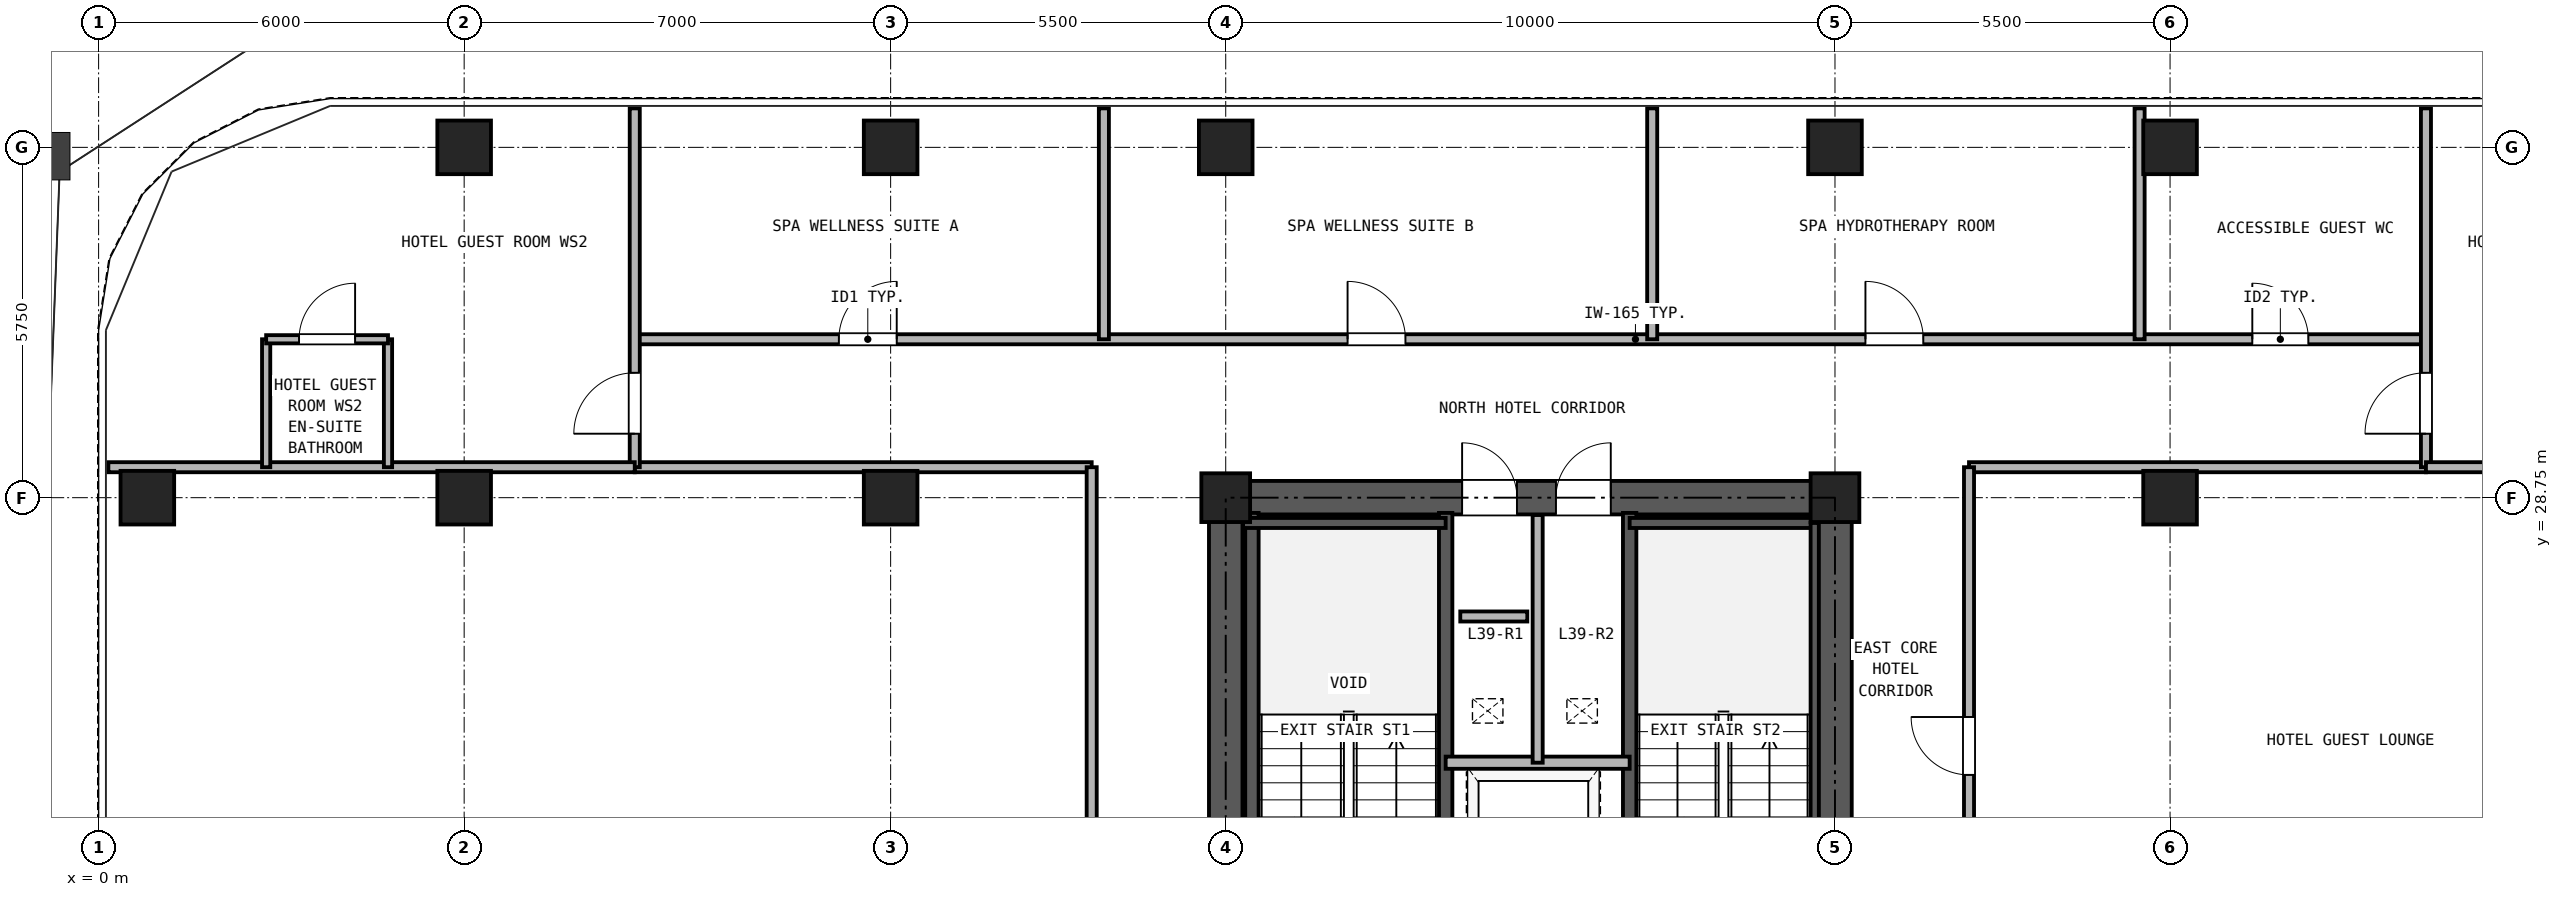
"""IFC4 building model, lengths in metres.
Left out: names, types, materials, properties, quantities, classifications, styles, units other than length and angle.
Written with IfcOpenShell. Run it as: python <this file> out.ifc"""

import sys

from ifc_helpers import new_model, si_unit, direction, frame, frame_2d, origin, origin_2d, place, context, subcontext, project, spatial, rectangle, hollow_rectangle, extrude, source, transform, mapped, element, fill, save


model = new_model("IFC4")
c1 = context("Model", 3, precision=1e-05, world=origin(), true_north=direction((0.0, 1.0)))
c2 = subcontext(c1, "Body", "Model", "MODEL_VIEW")
j1 = project(units=[si_unit("LENGTHUNIT", "METRE"), si_unit("PLANEANGLEUNIT", "RADIAN")], contexts=[c1])
p1 = place(None, origin())
s1 = spatial("IfcSite", under=j1, at=p1, CompositionType="ELEMENT")
p2 = place(p1, origin())
s2 = spatial("IfcBuilding", under=s1, at=p2, CompositionType="ELEMENT")
p3 = place(p2, frame((0.0, 0.0, 140.7)))
s3 = spatial("IfcBuildingStorey", under=s2, at=p3, CompositionType="ELEMENT", Elevation=140.7)
m1 = source(origin(), c2, "Body", "SweptSolid", [
    extrude(hollow_rectangle(XDim=0.88, YDim=0.88, WallThickness=0.05, at=origin_2d()), origin(), (0.0, 0.0, 1.0), 2.84),
])
for number, where, z_axis, x_axis in (
    (1, (6.0, 34.5, 0.0), (0.0, 0.0, 1.0), (1.0, 0.0, 0.0)),
    (2, (13.0, 34.5, 0.0), (0.0, 0.0, 1.0), (1.0, 0.0, 0.0)),
    (3, (18.5, 34.5, 0.0), (0.0, 0.0, 1.0), (1.0, 0.0, 0.0)),
    (4, (28.5, 34.5, 0.0), (0.0, 0.0, 1.0), (1.0, 0.0, 0.0)),
    (5, (34.0, 34.5, 0.0), (0.0, 0.0, 1.0), (1.0, 0.0, 0.0)),
    (6, (0.8, 28.75, 0.0), (0.0, 0.0, 1.0), (1.0, 0.0, 0.0)),
    (7, (6.0, 28.75, 0.0), (0.0, 0.0, 1.0), (1.0, 0.0, 0.0)),
    (8, (13.0, 28.75, 0.0), (0.0, 0.0, 1.0), (1.0, 0.0, 0.0)),
):
    element("IfcColumn", number, at=place(p3, frame(where, z_axis=z_axis, x_axis=x_axis)), inside=s3, PredefinedType="COLUMN", context=c2, shape_type="MappedRepresentation", body=[
        mapped(m1, transform((0.0, 0.0, 0.0), x_axis=(1.0, 0.0, 0.0), y_axis=(0.0, 1.0, 0.0), z_axis=(0.0, 0.0, 1.0), scale=1.0)),
    ])
m2 = source(origin(), c2, "Body", "SweptSolid", [
    extrude(hollow_rectangle(XDim=0.8, YDim=0.8, WallThickness=0.045, at=origin_2d()), origin(), (0.0, 0.0, 1.0), 2.84),
])
for number, where, z_axis, x_axis in (
    (9, (18.5, 28.75, 0.0), (0.0, 0.0, 1.0), (1.0, 0.0, 0.0)),
    (10, (28.5, 28.75, 0.0), (0.0, 0.0, 1.0), (1.0, 0.0, 0.0)),
):
    element("IfcColumn", number, at=place(p3, frame(where, z_axis=z_axis, x_axis=x_axis)), inside=s3, PredefinedType="COLUMN", context=c2, shape_type="MappedRepresentation", body=[
        mapped(m2, transform((0.0, 0.0, 0.0), x_axis=(1.0, 0.0, 0.0), y_axis=(0.0, 1.0, 0.0), z_axis=(0.0, 0.0, 1.0), scale=1.0)),
    ])
p4 = place(p3, frame((34.0, 28.75, 0.0), z_axis=(0.0, 0.0, 1.0), x_axis=(1.0, 0.0, 0.0)))
e11 = element("IfcColumn", 11, at=p4, inside=s3, PredefinedType="COLUMN", context=c2, shape_type="MappedRepresentation", body=[
    mapped(m1, transform((0.0, 0.0, 0.0), x_axis=(1.0, 0.0, 0.0), y_axis=(0.0, 1.0, 0.0), z_axis=(0.0, 0.0, 1.0), scale=1.0)),
])
p5 = place(p3, frame((18.225, 28.75, 0.0), z_axis=(0.0, 0.0, 1.0), x_axis=(1.0, 0.0, 0.0)))
e12 = element("IfcWall", 12, at=p5, inside=s3, PredefinedType="SHEAR", context=c2, shape_type="SweptSolid", body=[
    extrude(rectangle(XDim=10.55, YDim=0.55, at=frame_2d((5.275, 0.0))), origin(), (0.0, 0.0, 1.0), 2.84),
])
p6 = place(p5, frame((4.155, 0.0, 0.0)))
e13 = element("IfcOpeningElement", 13, at=p6, cuts=e12, PredefinedType="OPENING", context=c2, shape_type="SweptSolid", body=[
    extrude(rectangle(XDim=0.9, YDim=2.05, at=frame_2d((0.45, 1.025))), frame((0.0, 0.285, 0.0), z_axis=(0.0, -1.0, 0.0), x_axis=(1.0, 0.0, 0.0)), (0.0, 0.0, 1.0), 0.57),
])
p7 = place(p5, frame((5.695, 0.0, 0.0)))
e14 = element("IfcOpeningElement", 14, at=p7, cuts=e12, PredefinedType="OPENING", context=c2, shape_type="SweptSolid", body=[
    extrude(rectangle(XDim=0.9, YDim=2.05, at=frame_2d((0.45, 1.025))), frame((0.0, 0.285, 0.0), z_axis=(0.0, -1.0, 0.0), x_axis=(1.0, 0.0, 0.0)), (0.0, 0.0, 1.0), 0.57),
])
p8 = place(p3, frame((18.5, 11.775, 0.0), z_axis=(0.0, 0.0, 1.0), x_axis=(0.0, 1.0, 0.0)))
e15 = element("IfcWall", 15, at=p8, inside=s3, PredefinedType="SHEAR", context=c2, shape_type="SweptSolid", body=[
    extrude(rectangle(XDim=16.7, YDim=0.55, at=frame_2d((8.35, 0.0))), origin(), (0.0, 0.0, 1.0), 2.84),
])
p9 = place(p8, frame((7.375, 0.0, 0.0)))
e16 = element("IfcOpeningElement", 16, at=p9, cuts=e15, PredefinedType="OPENING", context=c2, shape_type="SweptSolid", body=[
    extrude(rectangle(XDim=1.15, YDim=2.2, at=frame_2d((0.575, 1.1))), frame((0.0, 0.285, 0.0), z_axis=(0.0, -1.0, 0.0), x_axis=(1.0, 0.0, 0.0)), (0.0, 0.0, 1.0), 0.57),
])
p10 = place(p3, frame((28.5, 11.775, 0.0), z_axis=(0.0, 0.0, 1.0), x_axis=(0.0, 1.0, 0.0)))
e17 = element("IfcWall", 17, at=p10, inside=s3, PredefinedType="SHEAR", context=c2, shape_type="SweptSolid", body=[
    extrude(rectangle(XDim=16.7, YDim=0.55, at=frame_2d((8.35, 0.0))), origin(), (0.0, 0.0, 1.0), 2.84),
])
p11 = place(p10, frame((7.375, 0.0, 0.0)))
e18 = element("IfcOpeningElement", 18, at=p11, cuts=e17, PredefinedType="OPENING", context=c2, shape_type="SweptSolid", body=[
    extrude(rectangle(XDim=1.15, YDim=2.2, at=frame_2d((0.575, 1.1))), frame((0.0, 0.285, 0.0), z_axis=(0.0, -1.0, 0.0), x_axis=(1.0, 0.0, 0.0)), (0.0, 0.0, 1.0), 0.57),
])
for number, where, z_axis, x_axis in (
    (19, (18.93, 21.39, 0.0), (0.0, 0.0, 1.0), (0.0, 1.0, 0.0)),
    (20, (22.11, 21.39, 0.0), (0.0, 0.0, 1.0), (0.0, 1.0, 0.0)),
    (21, (25.13, 21.39, 0.0), (0.0, 0.0, 1.0), (0.0, 1.0, 0.0)),
):
    element("IfcWall", number, at=place(p3, frame(where, z_axis=z_axis, x_axis=x_axis)), inside=s3, PredefinedType="SOLIDWALL", context=c2, shape_type="SweptSolid", body=[
        extrude(rectangle(XDim=7.11, YDim=0.22, at=frame_2d((3.555, 0.0))), origin(), (0.0, 0.0, 1.0), 2.84),
    ])
p12 = place(p3, frame((18.785, 28.335, 0.0), z_axis=(0.0, 0.0, 1.0), x_axis=(1.0, 0.0, 0.0)))
e22 = element("IfcWall", 22, at=p12, inside=s3, PredefinedType="PARTITIONING", context=c2, shape_type="SweptSolid", body=[
    extrude(rectangle(XDim=3.325, YDim=0.165, at=frame_2d((1.663, 0.0))), origin(), (0.0, 0.0, 1.0), 2.84),
])
p13 = place(p3, frame((25.13, 28.335, 0.0), z_axis=(0.0, 0.0, 1.0), x_axis=(1.0, 0.0, 0.0)))
e23 = element("IfcWall", 23, at=p13, inside=s3, PredefinedType="PARTITIONING", context=c2, shape_type="SweptSolid", body=[
    extrude(rectangle(XDim=3.085, YDim=0.165, at=frame_2d((1.542, 0.0))), origin(), (0.0, 0.0, 1.0), 2.84),
])
p14 = place(p3, frame((28.167, 21.39, 0.0), z_axis=(0.0, 0.0, 1.0), x_axis=(0.0, 1.0, 0.0)))
e24 = element("IfcWall", 24, at=p14, inside=s3, PredefinedType="PARTITIONING", context=c2, shape_type="SweptSolid", body=[
    extrude(rectangle(XDim=6.945, YDim=0.135, at=frame_2d((3.473, 0.0))), origin(), (0.0, 0.0, 1.0), 2.84),
])
p15 = place(p3, frame((22.11, 24.4, 0.0), z_axis=(0.0, 0.0, 1.0), x_axis=(1.0, 0.0, 0.0)))
e25 = element("IfcWall", 25, at=p15, inside=s3, PredefinedType="PARTITIONING", context=c2, shape_type="SweptSolid", body=[
    extrude(rectangle(XDim=3.02, YDim=0.2, at=frame_2d((1.51, 0.0))), origin(), (0.0, 0.0, 1.0), 2.84),
])
p16 = place(p3, frame((23.62, 24.4, 0.0), z_axis=(0.0, 0.0, 1.0), x_axis=(0.0, 1.0, 0.0)))
e26 = element("IfcWall", 26, at=p16, inside=s3, PredefinedType="PARTITIONING", context=c2, shape_type="SweptSolid", body=[
    extrude(rectangle(XDim=4.065, YDim=0.165, at=frame_2d((2.033, 0.0))), origin(), (0.0, 0.0, 1.0), 2.84),
])
p17 = place(p3, frame((8.8, 31.35, 0.0), z_axis=(0.0, 0.0, 1.0), x_axis=(1.0, 0.0, 0.0)))
e27 = element("IfcWall", 27, at=p17, inside=s3, PredefinedType="PARTITIONING", context=c2, shape_type="SweptSolid", body=[
    extrude(rectangle(XDim=29.4, YDim=0.165, at=frame_2d((14.7, 0.0))), origin(), (0.0, 0.0, 1.0), 2.84),
])
p18 = place(p17, frame((3.35, 0.0, 0.0)))
e28 = element("IfcOpeningElement", 28, at=p18, cuts=e27, PredefinedType="OPENING", context=c2, shape_type="SweptSolid", body=[
    extrude(rectangle(XDim=0.95, YDim=2.15, at=frame_2d((0.475, 1.075))), frame((0.0, 0.093, 0.0), z_axis=(0.0, -1.0, 0.0), x_axis=(1.0, 0.0, 0.0)), (0.0, 0.0, 1.0), 0.185),
])
p19 = place(p17, frame((11.7, 0.0, 0.0)))
e29 = element("IfcOpeningElement", 29, at=p19, cuts=e27, PredefinedType="OPENING", context=c2, shape_type="SweptSolid", body=[
    extrude(rectangle(XDim=0.95, YDim=2.15, at=frame_2d((0.475, 1.075))), frame((0.0, 0.093, 0.0), z_axis=(0.0, -1.0, 0.0), x_axis=(1.0, 0.0, 0.0)), (0.0, 0.0, 1.0), 0.185),
])
p20 = place(p17, frame((20.2, 0.0, 0.0)))
e30 = element("IfcOpeningElement", 30, at=p20, cuts=e27, PredefinedType="OPENING", context=c2, shape_type="SweptSolid", body=[
    extrude(rectangle(XDim=0.95, YDim=2.15, at=frame_2d((0.475, 1.075))), frame((0.0, 0.093, 0.0), z_axis=(0.0, -1.0, 0.0), x_axis=(1.0, 0.0, 0.0)), (0.0, 0.0, 1.0), 0.185),
])
p21 = place(p17, frame((26.55, 0.0, 0.0)))
e31 = element("IfcOpeningElement", 31, at=p21, cuts=e27, PredefinedType="OPENING", context=c2, shape_type="SweptSolid", body=[
    extrude(rectangle(XDim=0.92, YDim=2.1, at=frame_2d((0.46, 1.05))), frame((0.0, 0.093, 0.0), z_axis=(0.0, -1.0, 0.0), x_axis=(1.0, 0.0, 0.0)), (0.0, 0.0, 1.0), 0.185),
])
for number, where, z_axis, x_axis in (
    (32, (8.8, 29.25, 0.0), (0.0, 0.0, 1.0), (1.0, 0.0, 0.0)),
    (33, (30.7, 29.25, 0.0), (0.0, 0.0, 1.0), (1.0, 0.0, 0.0)),
):
    element("IfcWall", number, at=place(p3, frame(where, z_axis=z_axis, x_axis=x_axis)), inside=s3, PredefinedType="PARTITIONING", context=c2, shape_type="SweptSolid", body=[
        extrude(rectangle(XDim=7.5, YDim=0.165, at=frame_2d((3.75, 0.0))), origin(), (0.0, 0.0, 1.0), 2.84),
    ])
p22 = place(p3, frame((16.3, 11.05, 0.0), z_axis=(0.0, 0.0, 1.0), x_axis=(0.0, 1.0, 0.0)))
e34 = element("IfcWall", 34, at=p22, inside=s3, PredefinedType="PARTITIONING", context=c2, shape_type="SweptSolid", body=[
    extrude(rectangle(XDim=18.2, YDim=0.165, at=frame_2d((9.1, 0.0))), origin(), (0.0, 0.0, 1.0), 2.84),
])
p23 = place(p22, frame((8.6, 0.0, 0.0)))
e35 = element("IfcOpeningElement", 35, at=p23, cuts=e34, PredefinedType="OPENING", context=c2, shape_type="SweptSolid", body=[
    extrude(rectangle(XDim=0.95, YDim=2.15, at=frame_2d((0.475, 1.075))), frame((0.0, 0.093, 0.0), z_axis=(0.0, -1.0, 0.0), x_axis=(1.0, 0.0, 0.0)), (0.0, 0.0, 1.0), 0.185),
])
p24 = place(p3, frame((30.7, 11.05, 0.0), z_axis=(0.0, 0.0, 1.0), x_axis=(0.0, 1.0, 0.0)))
e36 = element("IfcWall", 36, at=p24, inside=s3, PredefinedType="PARTITIONING", context=c2, shape_type="SweptSolid", body=[
    extrude(rectangle(XDim=18.2, YDim=0.165, at=frame_2d((9.1, 0.0))), origin(), (0.0, 0.0, 1.0), 2.84),
])
p25 = place(p24, frame((4.05, 0.0, 0.0)))
e37 = element("IfcOpeningElement", 37, at=p25, cuts=e36, PredefinedType="OPENING", context=c2, shape_type="SweptSolid", body=[
    extrude(rectangle(XDim=0.95, YDim=2.15, at=frame_2d((0.475, 1.075))), frame((0.0, 0.093, 0.0), z_axis=(0.0, -1.0, 0.0), x_axis=(1.0, 0.0, 0.0)), (0.0, 0.0, 1.0), 0.185),
])
p26 = place(p24, frame((13.15, 0.0, 0.0)))
e38 = element("IfcOpeningElement", 38, at=p26, cuts=e36, PredefinedType="OPENING", context=c2, shape_type="SweptSolid", body=[
    extrude(rectangle(XDim=0.95, YDim=2.15, at=frame_2d((0.475, 1.075))), frame((0.0, 0.093, 0.0), z_axis=(0.0, -1.0, 0.0), x_axis=(1.0, 0.0, 0.0)), (0.0, 0.0, 1.0), 0.185),
])
p27 = place(p3, frame((8.8, 29.25, 0.0), z_axis=(0.0, 0.0, 1.0), x_axis=(0.0, 1.0, 0.0)))
e39 = element("IfcWall", 39, at=p27, inside=s3, PredefinedType="PARTITIONING", context=c2, shape_type="SweptSolid", body=[
    extrude(rectangle(XDim=5.89, YDim=0.165, at=frame_2d((2.945, 0.0))), origin(), (0.0, 0.0, 1.0), 2.84),
])
p28 = place(p27, frame((0.55, 0.0, 0.0)))
e40 = element("IfcOpeningElement", 40, at=p28, cuts=e39, PredefinedType="OPENING", context=c2, shape_type="SweptSolid", body=[
    extrude(rectangle(XDim=1.0, YDim=2.15, at=frame_2d((0.5, 1.075))), frame((0.0, 0.093, 0.0), z_axis=(0.0, -1.0, 0.0), x_axis=(1.0, 0.0, 0.0)), (0.0, 0.0, 1.0), 0.185),
])
p29 = place(p3, frame((38.2, 29.25, 0.0), z_axis=(0.0, 0.0, 1.0), x_axis=(0.0, 1.0, 0.0)))
e41 = element("IfcWall", 41, at=p29, inside=s3, PredefinedType="PARTITIONING", context=c2, shape_type="SweptSolid", body=[
    extrude(rectangle(XDim=5.89, YDim=0.165, at=frame_2d((2.945, 0.0))), origin(), (0.0, 0.0, 1.0), 2.84),
])
p30 = place(p29, frame((0.55, 0.0, 0.0)))
e42 = element("IfcOpeningElement", 42, at=p30, cuts=e41, PredefinedType="OPENING", context=c2, shape_type="SweptSolid", body=[
    extrude(rectangle(XDim=1.0, YDim=2.15, at=frame_2d((0.5, 1.075))), frame((0.0, 0.093, 0.0), z_axis=(0.0, -1.0, 0.0), x_axis=(1.0, 0.0, 0.0)), (0.0, 0.0, 1.0), 0.185),
])
for number, where, z_axis, x_axis in (
    (43, (0.16, 29.25, 0.0), (0.0, 0.0, 1.0), (1.0, 0.0, 0.0)),
    (44, (38.2, 29.25, 0.0), (0.0, 0.0, 1.0), (1.0, 0.0, 0.0)),
):
    element("IfcWall", number, at=place(p3, frame(where, z_axis=z_axis, x_axis=x_axis)), inside=s3, PredefinedType="PARTITIONING", context=c2, shape_type="SweptSolid", body=[
        extrude(rectangle(XDim=8.64, YDim=0.165, at=frame_2d((4.32, 0.0))), origin(), (0.0, 0.0, 1.0), 2.84),
    ])
for number, where, z_axis, x_axis in (
    (45, (2.75, 29.25, 0.0), (0.0, 0.0, 1.0), (0.0, 1.0, 0.0)),
    (46, (4.75, 29.25, 0.0), (0.0, 0.0, 1.0), (0.0, 1.0, 0.0)),
):
    element("IfcWall", number, at=place(p3, frame(where, z_axis=z_axis, x_axis=x_axis)), inside=s3, PredefinedType="PARTITIONING", context=c2, shape_type="SweptSolid", body=[
        extrude(rectangle(XDim=2.1, YDim=0.135, at=frame_2d((1.05, 0.0))), origin(), (0.0, 0.0, 1.0), 2.84),
    ])
p31 = place(p3, frame((2.75, 31.35, 0.0), z_axis=(0.0, 0.0, 1.0), x_axis=(1.0, 0.0, 0.0)))
e47 = element("IfcWall", 47, at=p31, inside=s3, PredefinedType="PARTITIONING", context=c2, shape_type="SweptSolid", body=[
    extrude(rectangle(XDim=2.0, YDim=0.135, at=frame_2d((1.0, 0.0))), origin(), (0.0, 0.0, 1.0), 2.84),
])
p32 = place(p31, frame((0.54, 0.0, 0.0)))
e48 = element("IfcOpeningElement", 48, at=p32, cuts=e47, PredefinedType="OPENING", context=c2, shape_type="SweptSolid", body=[
    extrude(rectangle(XDim=0.92, YDim=2.1, at=frame_2d((0.46, 1.05))), frame((0.0, 0.077, 0.0), z_axis=(0.0, -1.0, 0.0), x_axis=(1.0, 0.0, 0.0)), (0.0, 0.0, 1.0), 0.155),
])
for number, where, z_axis, x_axis in (
    (49, (16.5, 31.35, 0.0), (0.0, 0.0, 1.0), (0.0, 1.0, 0.0)),
    (50, (25.5, 31.35, 0.0), (0.0, 0.0, 1.0), (0.0, 1.0, 0.0)),
    (51, (33.5, 31.35, 0.0), (0.0, 0.0, 1.0), (0.0, 1.0, 0.0)),
):
    element("IfcWall", number, at=place(p3, frame(where, z_axis=z_axis, x_axis=x_axis)), inside=s3, PredefinedType="PARTITIONING", context=c2, shape_type="SweptSolid", body=[
        extrude(rectangle(XDim=3.79, YDim=0.165, at=frame_2d((1.895, 0.0))), origin(), (0.0, 0.0, 1.0), 2.84),
    ])
p33 = place(p3, frame((22.35, 26.8, 0.0), z_axis=(0.0, 0.0, 1.0), x_axis=(1.0, 0.0, 0.0)))
e52 = element("IfcWall", 52, at=p33, inside=s3, PredefinedType="PARTITIONING", context=c2, shape_type="SweptSolid", body=[
    extrude(rectangle(XDim=1.1, YDim=0.165, at=frame_2d((0.55, 0.0))), origin(), (0.0, 0.0, 1.0), 2.84),
])
p34 = place(p6, origin())
e53 = element("IfcDoor", 53, at=p34, inside=s3, OperationType="SINGLE_SWING_LEFT", PredefinedType="DOOR", context=c2, shape_type="SweptSolid", body=[
    extrude(rectangle(XDim=0.9, YDim=2.05, at=frame_2d((0.45, 1.025))), frame((0.0, 0.025, 0.0), z_axis=(0.0, -1.0, 0.0), x_axis=(1.0, 0.0, 0.0)), (0.0, 0.0, 1.0), 0.05),
])
fill(e13, e53)
p35 = place(p7, origin())
e54 = element("IfcDoor", 54, at=p35, inside=s3, OperationType="SINGLE_SWING_RIGHT", PredefinedType="DOOR", context=c2, shape_type="SweptSolid", body=[
    extrude(rectangle(XDim=0.9, YDim=2.05, at=frame_2d((0.45, 1.025))), frame((0.0, 0.025, 0.0), z_axis=(0.0, -1.0, 0.0), x_axis=(1.0, 0.0, 0.0)), (0.0, 0.0, 1.0), 0.05),
])
fill(e14, e54)
p36 = place(p32, frame((0.92, 0.0, 0.0), z_axis=(0.0, 0.0, 1.0), x_axis=(-1.0, 0.0, 0.0)))
e55 = element("IfcDoor", 55, at=p36, inside=s3, OperationType="SINGLE_SWING_RIGHT", PredefinedType="DOOR", context=c2, shape_type="SweptSolid", body=[
    extrude(rectangle(XDim=0.92, YDim=2.1, at=frame_2d((0.46, 1.05))), frame((0.0, 0.025, 0.0), z_axis=(0.0, -1.0, 0.0), x_axis=(1.0, 0.0, 0.0)), (0.0, 0.0, 1.0), 0.05),
])
fill(e48, e55)
p37 = place(p28, origin())
e56 = element("IfcDoor", 56, at=p37, inside=s3, OperationType="SINGLE_SWING_LEFT", PredefinedType="DOOR", context=c2, shape_type="SweptSolid", body=[
    extrude(rectangle(XDim=1.0, YDim=2.15, at=frame_2d((0.5, 1.075))), frame((0.0, 0.025, 0.0), z_axis=(0.0, -1.0, 0.0), x_axis=(1.0, 0.0, 0.0)), (0.0, 0.0, 1.0), 0.05),
])
fill(e40, e56)
p38 = place(p30, frame((1.0, 0.0, 0.0), z_axis=(0.0, 0.0, 1.0), x_axis=(-1.0, 0.0, 0.0)))
e57 = element("IfcDoor", 57, at=p38, inside=s3, OperationType="SINGLE_SWING_LEFT", PredefinedType="DOOR", context=c2, shape_type="SweptSolid", body=[
    extrude(rectangle(XDim=1.0, YDim=2.15, at=frame_2d((0.5, 1.075))), frame((0.0, 0.025, 0.0), z_axis=(0.0, -1.0, 0.0), x_axis=(1.0, 0.0, 0.0)), (0.0, 0.0, 1.0), 0.05),
])
fill(e42, e57)
p39 = place(p18, origin())
e58 = element("IfcDoor", 58, at=p39, inside=s3, OperationType="SINGLE_SWING_RIGHT", PredefinedType="DOOR", context=c2, shape_type="SweptSolid", body=[
    extrude(rectangle(XDim=0.95, YDim=2.15, at=frame_2d((0.475, 1.075))), frame((0.0, 0.025, 0.0), z_axis=(0.0, -1.0, 0.0), x_axis=(1.0, 0.0, 0.0)), (0.0, 0.0, 1.0), 0.05),
])
fill(e28, e58)
p40 = place(p19, origin())
e59 = element("IfcDoor", 59, at=p40, inside=s3, OperationType="SINGLE_SWING_LEFT", PredefinedType="DOOR", context=c2, shape_type="SweptSolid", body=[
    extrude(rectangle(XDim=0.95, YDim=2.15, at=frame_2d((0.475, 1.075))), frame((0.0, 0.025, 0.0), z_axis=(0.0, -1.0, 0.0), x_axis=(1.0, 0.0, 0.0)), (0.0, 0.0, 1.0), 0.05),
])
fill(e29, e59)
p41 = place(p20, origin())
e60 = element("IfcDoor", 60, at=p41, inside=s3, OperationType="SINGLE_SWING_LEFT", PredefinedType="DOOR", context=c2, shape_type="SweptSolid", body=[
    extrude(rectangle(XDim=0.95, YDim=2.15, at=frame_2d((0.475, 1.075))), frame((0.0, 0.025, 0.0), z_axis=(0.0, -1.0, 0.0), x_axis=(1.0, 0.0, 0.0)), (0.0, 0.0, 1.0), 0.05),
])
fill(e30, e60)
p42 = place(p21, origin())
e61 = element("IfcDoor", 61, at=p42, inside=s3, OperationType="SINGLE_SWING_LEFT", PredefinedType="DOOR", context=c2, shape_type="SweptSolid", body=[
    extrude(rectangle(XDim=0.92, YDim=2.1, at=frame_2d((0.46, 1.05))), frame((0.0, 0.025, 0.0), z_axis=(0.0, -1.0, 0.0), x_axis=(1.0, 0.0, 0.0)), (0.0, 0.0, 1.0), 0.05),
])
fill(e31, e61)
p43 = place(p26, origin())
e62 = element("IfcDoor", 62, at=p43, inside=s3, OperationType="SINGLE_SWING_RIGHT", PredefinedType="DOOR", context=c2, shape_type="SweptSolid", body=[
    extrude(rectangle(XDim=0.95, YDim=2.15, at=frame_2d((0.475, 1.075))), frame((0.0, 0.025, 0.0), z_axis=(0.0, -1.0, 0.0), x_axis=(1.0, 0.0, 0.0)), (0.0, 0.0, 1.0), 0.05),
])
fill(e38, e62)
save(model, sys.argv[1])
